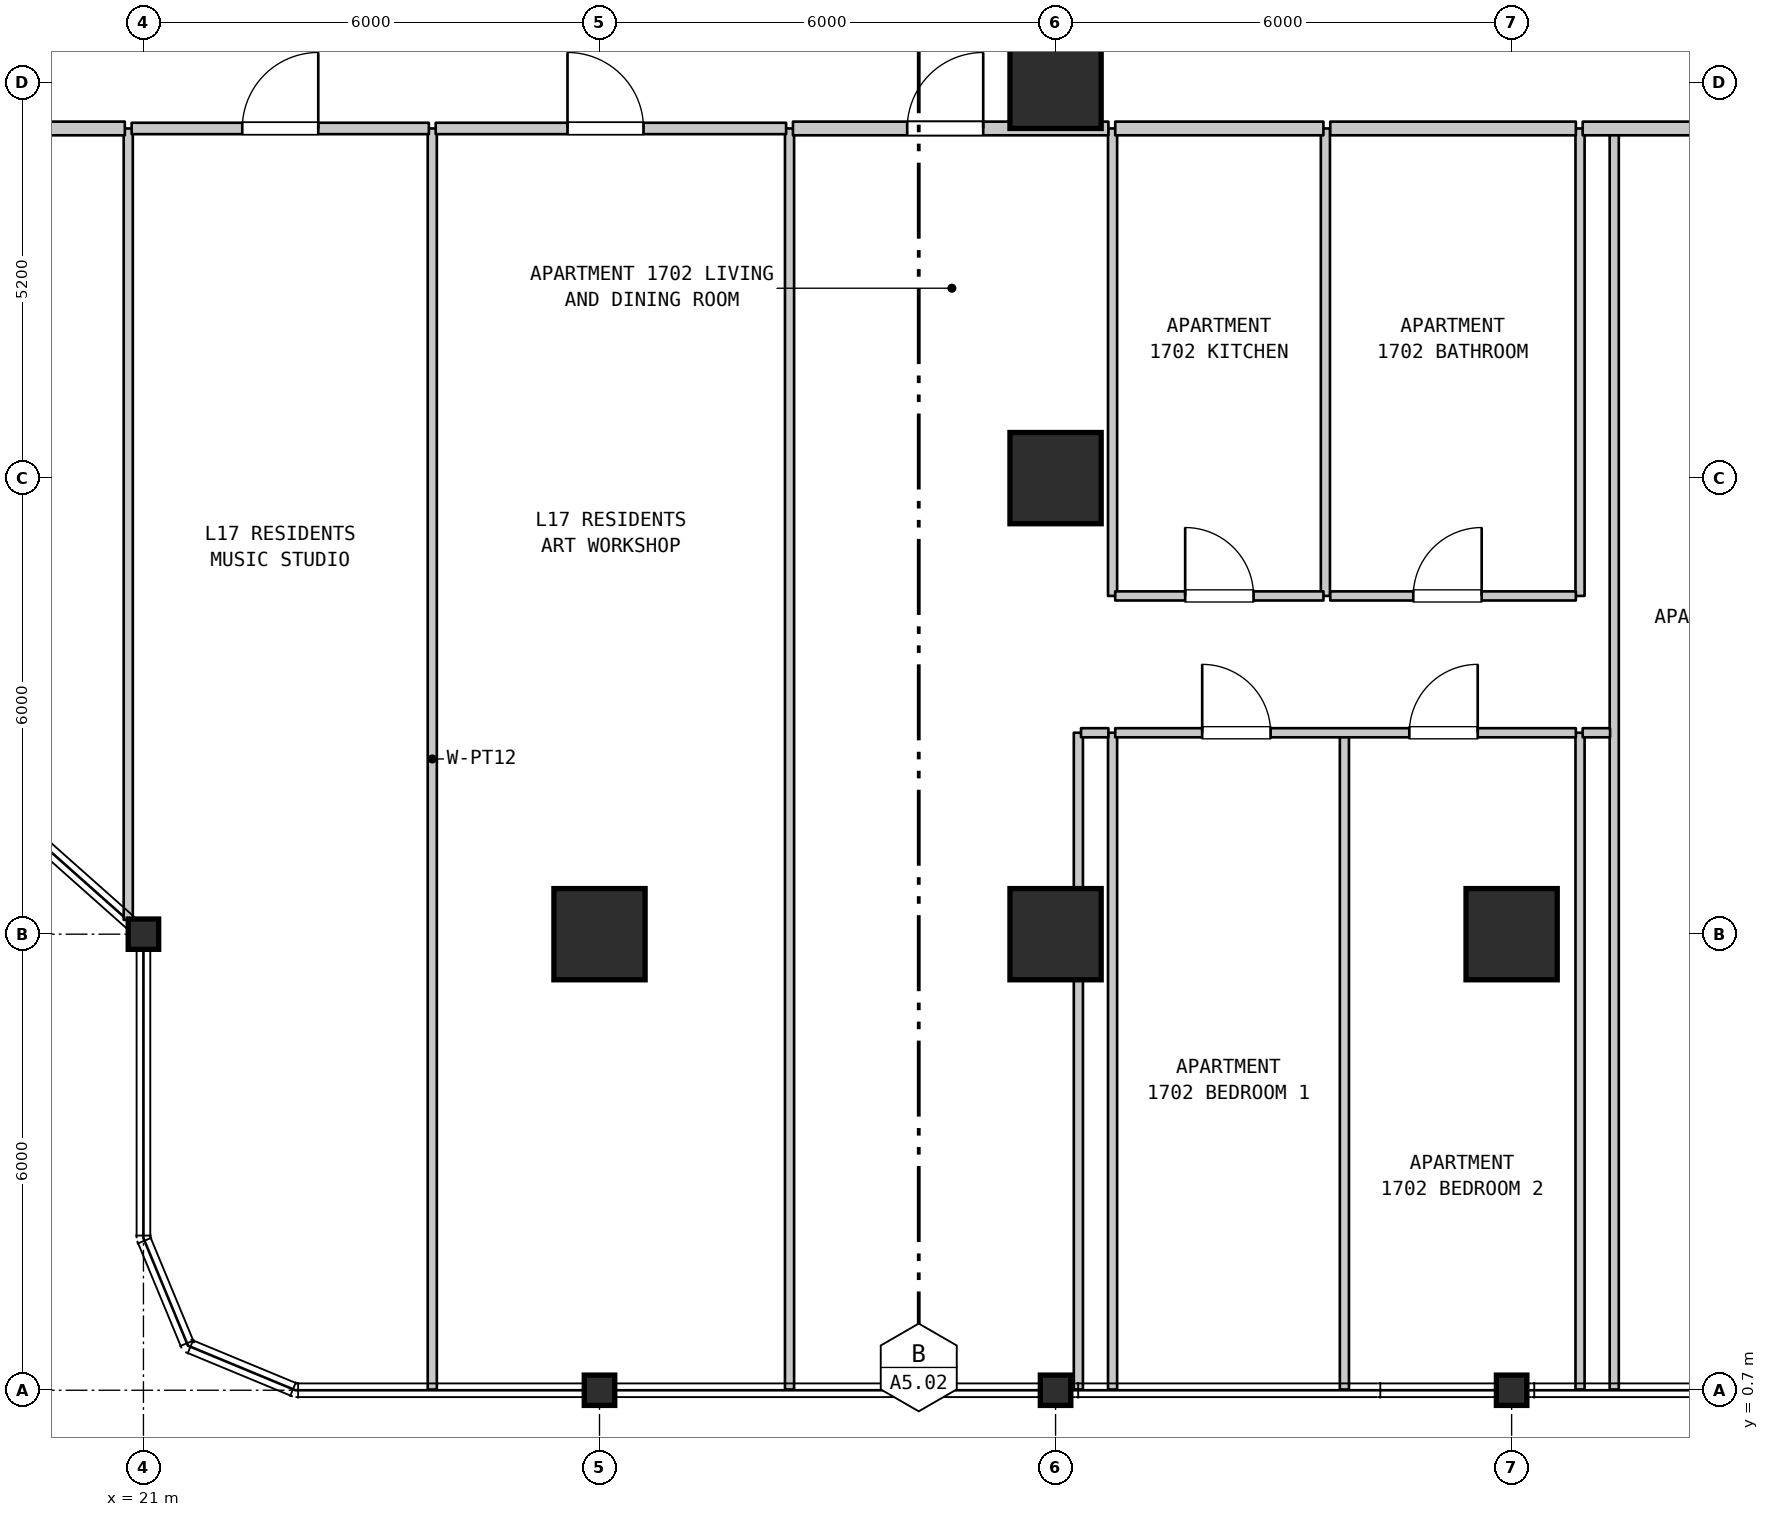
"""IFC4 building model, lengths in metres.
Left out: names, types, materials, properties, quantities, classifications, styles, units other than length and angle.
Written with IfcOpenShell. Run it as: python <this file> out.ifc"""

import sys

from ifc_helpers import new_model, si_unit, direction, frame, frame_2d, origin, origin_2d, place, context, subcontext, project, spatial, rectangle, i_section, extrude, element, fill, save


model = new_model("IFC4")
c1 = context("Model", 3, precision=1e-05, world=origin(), true_north=direction((0.0, 1.0)))
c2 = subcontext(c1, "Body", "Model", "MODEL_VIEW")
j1 = project(units=[si_unit("LENGTHUNIT", "METRE"), si_unit("PLANEANGLEUNIT", "RADIAN")], contexts=[c1])
p1 = place(None, origin())
s1 = spatial("IfcSite", under=j1, at=p1, CompositionType="ELEMENT")
p2 = place(p1, origin())
s2 = spatial("IfcBuilding", under=s1, at=p2, CompositionType="ELEMENT")
p3 = place(p2, frame((0.0, 0.0, 73.8)))
s3 = spatial("IfcBuildingStorey", under=s2, at=p3, CompositionType="ELEMENT", Elevation=73.8)
for number, where, z_axis, x_axis in (
    (1, (21.0, 6.7, 0.0), (0.0, 0.0, 1.0), (1.0, 0.0, 0.0)),
    (2, (27.0, 0.7, 0.0), (0.0, 0.0, 1.0), (1.0, 0.0, 0.0)),
):
    element("IfcColumn", number, at=place(p3, frame(where, z_axis=z_axis, x_axis=x_axis)), inside=s3, PredefinedType="COLUMN", context=c2, shape_type="SweptSolid", body=[
        extrude(i_section(OverallWidth=0.401, OverallDepth=0.399, WebThickness=0.025, FlangeThickness=0.04, FilletRadius=0.015, at=origin_2d()), origin(), (0.0, 0.0, 1.0), 3.7),
    ])
p4 = place(p3, frame((27.0, 6.7, 0.0), z_axis=(0.0, 0.0, 1.0), x_axis=(1.0, 0.0, 0.0)))
e3 = element("IfcColumn", 3, at=p4, inside=s3, PredefinedType="COLUMN", context=c2, shape_type="SweptSolid", body=[
    extrude(rectangle(XDim=1.2, YDim=1.2, at=origin_2d()), origin(), (0.0, 0.0, 1.0), 3.7),
])
p5 = place(p3, frame((33.0, 0.7, 0.0), z_axis=(0.0, 0.0, 1.0), x_axis=(1.0, 0.0, 0.0)))
e4 = element("IfcColumn", 4, at=p5, inside=s3, PredefinedType="COLUMN", context=c2, shape_type="SweptSolid", body=[
    extrude(i_section(OverallWidth=0.401, OverallDepth=0.399, WebThickness=0.025, FlangeThickness=0.04, FilletRadius=0.015, at=origin_2d()), origin(), (0.0, 0.0, 1.0), 3.7),
])
for number, where, z_axis, x_axis in (
    (5, (33.0, 6.7, 0.0), (0.0, 0.0, 1.0), (1.0, 0.0, 0.0)),
    (6, (33.0, 12.7, 0.0), (0.0, 0.0, 1.0), (1.0, 0.0, 0.0)),
    (7, (33.0, 17.9, 0.0), (0.0, 0.0, 1.0), (1.0, 0.0, 0.0)),
):
    element("IfcColumn", number, at=place(p3, frame(where, z_axis=z_axis, x_axis=x_axis)), inside=s3, PredefinedType="COLUMN", context=c2, shape_type="SweptSolid", body=[
        extrude(rectangle(XDim=1.2, YDim=1.2, at=origin_2d()), origin(), (0.0, 0.0, 1.0), 3.7),
    ])
p6 = place(p3, frame((39.0, 0.7, 0.0), z_axis=(0.0, 0.0, 1.0), x_axis=(1.0, 0.0, 0.0)))
e8 = element("IfcColumn", 8, at=p6, inside=s3, PredefinedType="COLUMN", context=c2, shape_type="SweptSolid", body=[
    extrude(i_section(OverallWidth=0.401, OverallDepth=0.399, WebThickness=0.025, FlangeThickness=0.04, FilletRadius=0.015, at=origin_2d()), origin(), (0.0, 0.0, 1.0), 3.7),
])
p7 = place(p3, frame((39.0, 6.7, 0.0), z_axis=(0.0, 0.0, 1.0), x_axis=(1.0, 0.0, 0.0)))
e9 = element("IfcColumn", 9, at=p7, inside=s3, PredefinedType="COLUMN", context=c2, shape_type="SweptSolid", body=[
    extrude(rectangle(XDim=1.2, YDim=1.2, at=origin_2d()), origin(), (0.0, 0.0, 1.0), 3.7),
])
p8 = place(p3, frame((20.8, 6.888, 0.0), z_axis=(0.0, 0.0, 1.0), x_axis=(0.0, 1.0, 0.0)))
e10 = element("IfcWall", 10, at=p8, inside=s3, PredefinedType="PARTITIONING", context=c2, shape_type="SweptSolid", body=[
    extrude(rectangle(XDim=10.412, YDim=0.12, at=frame_2d((5.206, 0.0))), origin(), (0.0, 0.0, 1.0), 3.385),
])
for number, where, z_axis, x_axis in (
    (11, (24.8, 0.71, 0.0), (0.0, 0.0, 1.0), (0.0, 1.0, 0.0)),
    (12, (29.5, 0.71, 0.0), (0.0, 0.0, 1.0), (0.0, 1.0, 0.0)),
):
    element("IfcWall", number, at=place(p3, frame(where, z_axis=z_axis, x_axis=x_axis)), inside=s3, PredefinedType="PARTITIONING", context=c2, shape_type="SweptSolid", body=[
        extrude(rectangle(XDim=16.59, YDim=0.12, at=frame_2d((8.295, 0.0))), origin(), (0.0, 0.0, 1.0), 3.385),
    ])
for number, where, z_axis, x_axis in (
    (13, (33.3, 0.71, 0.0), (0.0, 0.0, 1.0), (0.0, 1.0, 0.0)),
    (14, (33.75, 0.71, 0.0), (0.0, 0.0, 1.0), (0.0, 1.0, 0.0)),
):
    element("IfcWall", number, at=place(p3, frame(where, z_axis=z_axis, x_axis=x_axis)), inside=s3, PredefinedType="PARTITIONING", context=c2, shape_type="SweptSolid", body=[
        extrude(rectangle(XDim=8.64, YDim=0.12, at=frame_2d((4.32, 0.0))), origin(), (0.0, 0.0, 1.0), 3.385),
    ])
for number, where, z_axis, x_axis in (
    (15, (33.75, 11.15, 0.0), (0.0, 0.0, 1.0), (0.0, 1.0, 0.0)),
    (16, (36.55, 11.15, 0.0), (0.0, 0.0, 1.0), (0.0, 1.0, 0.0)),
):
    element("IfcWall", number, at=place(p3, frame(where, z_axis=z_axis, x_axis=x_axis)), inside=s3, PredefinedType="PARTITIONING", context=c2, shape_type="SweptSolid", body=[
        extrude(rectangle(XDim=6.15, YDim=0.12, at=frame_2d((3.075, 0.0))), origin(), (0.0, 0.0, 1.0), 3.385),
    ])
for number, where, z_axis, x_axis in (
    (17, (36.8, 0.71, 0.0), (0.0, 0.0, 1.0), (0.0, 1.0, 0.0)),
    (18, (39.9, 0.71, 0.0), (0.0, 0.0, 1.0), (0.0, 1.0, 0.0)),
):
    element("IfcWall", number, at=place(p3, frame(where, z_axis=z_axis, x_axis=x_axis)), inside=s3, PredefinedType="PARTITIONING", context=c2, shape_type="SweptSolid", body=[
        extrude(rectangle(XDim=8.64, YDim=0.12, at=frame_2d((4.32, 0.0))), origin(), (0.0, 0.0, 1.0), 3.385),
    ])
p9 = place(p3, frame((39.9, 11.15, 0.0), z_axis=(0.0, 0.0, 1.0), x_axis=(0.0, 1.0, 0.0)))
e19 = element("IfcWall", 19, at=p9, inside=s3, PredefinedType="PARTITIONING", context=c2, shape_type="SweptSolid", body=[
    extrude(rectangle(XDim=6.15, YDim=0.12, at=frame_2d((3.075, 0.0))), origin(), (0.0, 0.0, 1.0), 3.385),
])
p10 = place(p3, frame((40.35, 0.71, 0.0), z_axis=(0.0, 0.0, 1.0), x_axis=(0.0, 1.0, 0.0)))
e20 = element("IfcWall", 20, at=p10, inside=s3, PredefinedType="PARTITIONING", context=c2, shape_type="SweptSolid", body=[
    extrude(rectangle(XDim=16.59, YDim=0.12, at=frame_2d((8.295, 0.0))), origin(), (0.0, 0.0, 1.0), 3.385),
])
p11 = place(p3, frame((33.335, 9.35, 0.0), z_axis=(0.0, 0.0, 1.0), x_axis=(1.0, 0.0, 0.0)))
e21 = element("IfcWall", 21, at=p11, inside=s3, PredefinedType="PARTITIONING", context=c2, shape_type="SweptSolid", body=[
    extrude(rectangle(XDim=0.36, YDim=0.12, at=frame_2d((0.18, 0.0))), origin(), (0.0, 0.0, 1.0), 3.385),
])
p12 = place(p3, frame((33.785, 9.35, 0.0), z_axis=(0.0, 0.0, 1.0), x_axis=(1.0, 0.0, 0.0)))
e22 = element("IfcWall", 22, at=p12, inside=s3, PredefinedType="PARTITIONING", context=c2, shape_type="SweptSolid", body=[
    extrude(rectangle(XDim=6.06, YDim=0.12, at=frame_2d((3.03, 0.0))), origin(), (0.0, 0.0, 1.0), 3.385),
])
p13 = place(p12, frame((1.144, 0.0, 0.0)))
e23 = element("IfcOpeningElement", 23, at=p13, cuts=e22, PredefinedType="OPENING", context=c2, shape_type="SweptSolid", body=[
    extrude(rectangle(XDim=0.9, YDim=2.15, at=frame_2d((0.45, 1.075))), frame((0.0, 0.07, 0.0), z_axis=(0.0, -1.0, 0.0), x_axis=(1.0, 0.0, 0.0)), (0.0, 0.0, 1.0), 0.14),
])
p14 = place(p12, frame((3.869, 0.0, 0.0)))
e24 = element("IfcOpeningElement", 24, at=p14, cuts=e22, PredefinedType="OPENING", context=c2, shape_type="SweptSolid", body=[
    extrude(rectangle(XDim=0.9, YDim=2.15, at=frame_2d((0.45, 1.075))), frame((0.0, 0.07, 0.0), z_axis=(0.0, -1.0, 0.0), x_axis=(1.0, 0.0, 0.0)), (0.0, 0.0, 1.0), 0.14),
])
p15 = place(p3, frame((39.935, 9.35, 0.0), z_axis=(0.0, 0.0, 1.0), x_axis=(1.0, 0.0, 0.0)))
e25 = element("IfcWall", 25, at=p15, inside=s3, PredefinedType="PARTITIONING", context=c2, shape_type="SweptSolid", body=[
    extrude(rectangle(XDim=0.36, YDim=0.12, at=frame_2d((0.18, 0.0))), origin(), (0.0, 0.0, 1.0), 3.385),
])
p16 = place(p3, frame((33.785, 11.15, 0.0), z_axis=(0.0, 0.0, 1.0), x_axis=(1.0, 0.0, 0.0)))
e26 = element("IfcWall", 26, at=p16, inside=s3, PredefinedType="PARTITIONING", context=c2, shape_type="SweptSolid", body=[
    extrude(rectangle(XDim=2.739, YDim=0.12, at=frame_2d((1.37, 0.0))), origin(), (0.0, 0.0, 1.0), 3.385),
])
p17 = place(p16, frame((0.92, 0.0, 0.0)))
e27 = element("IfcOpeningElement", 27, at=p17, cuts=e26, PredefinedType="OPENING", context=c2, shape_type="SweptSolid", body=[
    extrude(rectangle(XDim=0.9, YDim=2.15, at=frame_2d((0.45, 1.075))), frame((0.0, 0.07, 0.0), z_axis=(0.0, -1.0, 0.0), x_axis=(1.0, 0.0, 0.0)), (0.0, 0.0, 1.0), 0.14),
])
p18 = place(p3, frame((36.614, 11.15, 0.0), z_axis=(0.0, 0.0, 1.0), x_axis=(1.0, 0.0, 0.0)))
e28 = element("IfcWall", 28, at=p18, inside=s3, PredefinedType="PARTITIONING", context=c2, shape_type="SweptSolid", body=[
    extrude(rectangle(XDim=3.231, YDim=0.12, at=frame_2d((1.615, 0.0))), origin(), (0.0, 0.0, 1.0), 3.385),
])
p19 = place(p18, frame((1.092, 0.0, 0.0)))
e29 = element("IfcOpeningElement", 29, at=p19, cuts=e28, PredefinedType="OPENING", context=c2, shape_type="SweptSolid", body=[
    extrude(rectangle(XDim=0.9, YDim=2.1, at=frame_2d((0.45, 1.05))), frame((0.0, 0.07, 0.0), z_axis=(0.0, -1.0, 0.0), x_axis=(1.0, 0.0, 0.0)), (0.0, 0.0, 1.0), 0.14),
])
p20 = place(p3, frame((18.895, 17.3, 0.0), z_axis=(0.0, 0.0, 1.0), x_axis=(1.0, 0.0, 0.0)))
e30 = element("IfcWall", 30, at=p20, inside=s3, PredefinedType="STANDARD", context=c2, shape_type="SweptSolid", body=[
    extrude(rectangle(XDim=1.86, YDim=0.18, at=frame_2d((0.93, 0.0))), origin(), (0.0, 0.0, 1.0), 3.385),
])
p21 = place(p3, frame((20.845, 17.3, 0.0), z_axis=(0.0, 0.0, 1.0), x_axis=(1.0, 0.0, 0.0)))
e31 = element("IfcWall", 31, at=p21, inside=s3, PredefinedType="STANDARD", context=c2, shape_type="SweptSolid", body=[
    extrude(rectangle(XDim=3.91, YDim=0.15, at=frame_2d((1.955, 0.0))), origin(), (0.0, 0.0, 1.0), 3.385),
])
p22 = place(p21, frame((1.455, 0.0, 0.0)))
e32 = element("IfcOpeningElement", 32, at=p22, cuts=e31, PredefinedType="OPENING", context=c2, shape_type="SweptSolid", body=[
    extrude(rectangle(XDim=1.0, YDim=2.15, at=frame_2d((0.5, 1.075))), frame((0.0, 0.085, 0.0), z_axis=(0.0, -1.0, 0.0), x_axis=(1.0, 0.0, 0.0)), (0.0, 0.0, 1.0), 0.17),
])
p23 = place(p3, frame((24.845, 17.3, 0.0), z_axis=(0.0, 0.0, 1.0), x_axis=(1.0, 0.0, 0.0)))
e33 = element("IfcWall", 33, at=p23, inside=s3, PredefinedType="STANDARD", context=c2, shape_type="SweptSolid", body=[
    extrude(rectangle(XDim=4.61, YDim=0.15, at=frame_2d((2.305, 0.0))), origin(), (0.0, 0.0, 1.0), 3.385),
])
p24 = place(p23, frame((1.734, 0.0, 0.0)))
e34 = element("IfcOpeningElement", 34, at=p24, cuts=e33, PredefinedType="OPENING", context=c2, shape_type="SweptSolid", body=[
    extrude(rectangle(XDim=1.0, YDim=2.15, at=frame_2d((0.5, 1.075))), frame((0.0, 0.085, 0.0), z_axis=(0.0, -1.0, 0.0), x_axis=(1.0, 0.0, 0.0)), (0.0, 0.0, 1.0), 0.17),
])
p25 = place(p3, frame((29.545, 17.3, 0.0), z_axis=(0.0, 0.0, 1.0), x_axis=(1.0, 0.0, 0.0)))
e35 = element("IfcWall", 35, at=p25, inside=s3, PredefinedType="STANDARD", context=c2, shape_type="SweptSolid", body=[
    extrude(rectangle(XDim=4.15, YDim=0.18, at=frame_2d((2.075, 0.0))), origin(), (0.0, 0.0, 1.0), 3.385),
])
p26 = place(p25, frame((1.503, 0.0, 0.0)))
e36 = element("IfcOpeningElement", 36, at=p26, cuts=e35, PredefinedType="OPENING", context=c2, shape_type="SweptSolid", body=[
    extrude(rectangle(XDim=1.0, YDim=2.15, at=frame_2d((0.5, 1.075))), frame((0.0, 0.1, 0.0), z_axis=(0.0, -1.0, 0.0), x_axis=(1.0, 0.0, 0.0)), (0.0, 0.0, 1.0), 0.2),
])
p27 = place(p3, frame((33.785, 17.3, 0.0), z_axis=(0.0, 0.0, 1.0), x_axis=(1.0, 0.0, 0.0)))
e37 = element("IfcWall", 37, at=p27, inside=s3, PredefinedType="STANDARD", context=c2, shape_type="SweptSolid", body=[
    extrude(rectangle(XDim=2.739, YDim=0.18, at=frame_2d((1.37, 0.0))), origin(), (0.0, 0.0, 1.0), 3.385),
])
p28 = place(p3, frame((36.614, 17.3, 0.0), z_axis=(0.0, 0.0, 1.0), x_axis=(1.0, 0.0, 0.0)))
e38 = element("IfcWall", 38, at=p28, inside=s3, PredefinedType="STANDARD", context=c2, shape_type="SweptSolid", body=[
    extrude(rectangle(XDim=3.231, YDim=0.18, at=frame_2d((1.615, 0.0))), origin(), (0.0, 0.0, 1.0), 3.385),
])
p29 = place(p3, frame((39.935, 17.3, 0.0), z_axis=(0.0, 0.0, 1.0), x_axis=(1.0, 0.0, 0.0)))
e39 = element("IfcWall", 39, at=p29, inside=s3, PredefinedType="STANDARD", context=c2, shape_type="SweptSolid", body=[
    extrude(rectangle(XDim=4.64, YDim=0.18, at=frame_2d((2.32, 0.0))), origin(), (0.0, 0.0, 1.0), 3.385),
])
p30 = place(p29, frame((2.02, 0.0, 0.0)))
e40 = element("IfcOpeningElement", 40, at=p30, cuts=e39, PredefinedType="OPENING", context=c2, shape_type="SweptSolid", body=[
    extrude(rectangle(XDim=1.0, YDim=2.15, at=frame_2d((0.5, 1.075))), frame((0.0, 0.1, 0.0), z_axis=(0.0, -1.0, 0.0), x_axis=(1.0, 0.0, 0.0)), (0.0, 0.0, 1.0), 0.2),
])
p31 = place(p13, origin())
e41 = element("IfcDoor", 41, at=p31, inside=s3, OperationType="SINGLE_SWING_LEFT", PredefinedType="DOOR", context=c2, shape_type="SweptSolid", body=[
    extrude(rectangle(XDim=0.9, YDim=2.15, at=frame_2d((0.45, 1.075))), frame((0.0, 0.025, 0.0), z_axis=(0.0, -1.0, 0.0), x_axis=(1.0, 0.0, 0.0)), (0.0, 0.0, 1.0), 0.05),
])
fill(e23, e41)
p32 = place(p14, origin())
e42 = element("IfcDoor", 42, at=p32, inside=s3, OperationType="SINGLE_SWING_RIGHT", PredefinedType="DOOR", context=c2, shape_type="SweptSolid", body=[
    extrude(rectangle(XDim=0.9, YDim=2.15, at=frame_2d((0.45, 1.075))), frame((0.0, 0.025, 0.0), z_axis=(0.0, -1.0, 0.0), x_axis=(1.0, 0.0, 0.0)), (0.0, 0.0, 1.0), 0.05),
])
fill(e24, e42)
p33 = place(p17, origin())
e43 = element("IfcDoor", 43, at=p33, inside=s3, OperationType="SINGLE_SWING_LEFT", PredefinedType="DOOR", context=c2, shape_type="SweptSolid", body=[
    extrude(rectangle(XDim=0.9, YDim=2.15, at=frame_2d((0.45, 1.075))), frame((0.0, 0.025, 0.0), z_axis=(0.0, -1.0, 0.0), x_axis=(1.0, 0.0, 0.0)), (0.0, 0.0, 1.0), 0.05),
])
fill(e27, e43)
p34 = place(p19, origin())
e44 = element("IfcDoor", 44, at=p34, inside=s3, OperationType="SINGLE_SWING_RIGHT", PredefinedType="DOOR", context=c2, shape_type="SweptSolid", body=[
    extrude(rectangle(XDim=0.9, YDim=2.1, at=frame_2d((0.45, 1.05))), frame((0.0, 0.025, 0.0), z_axis=(0.0, -1.0, 0.0), x_axis=(1.0, 0.0, 0.0)), (0.0, 0.0, 1.0), 0.05),
])
fill(e29, e44)
p35 = place(p22, origin())
e45 = element("IfcDoor", 45, at=p35, inside=s3, OperationType="SINGLE_SWING_RIGHT", PredefinedType="DOOR", context=c2, shape_type="SweptSolid", body=[
    extrude(rectangle(XDim=1.0, YDim=2.15, at=frame_2d((0.5, 1.075))), frame((0.0, 0.025, 0.0), z_axis=(0.0, -1.0, 0.0), x_axis=(1.0, 0.0, 0.0)), (0.0, 0.0, 1.0), 0.05),
])
fill(e32, e45)
p36 = place(p24, origin())
e46 = element("IfcDoor", 46, at=p36, inside=s3, OperationType="SINGLE_SWING_LEFT", PredefinedType="DOOR", context=c2, shape_type="SweptSolid", body=[
    extrude(rectangle(XDim=1.0, YDim=2.15, at=frame_2d((0.5, 1.075))), frame((0.0, 0.025, 0.0), z_axis=(0.0, -1.0, 0.0), x_axis=(1.0, 0.0, 0.0)), (0.0, 0.0, 1.0), 0.05),
])
fill(e34, e46)
p37 = place(p26, origin())
e47 = element("IfcDoor", 47, at=p37, inside=s3, OperationType="SINGLE_SWING_RIGHT", PredefinedType="DOOR", context=c2, shape_type="SweptSolid", body=[
    extrude(rectangle(XDim=1.0, YDim=2.15, at=frame_2d((0.5, 1.075))), frame((0.0, 0.025, 0.0), z_axis=(0.0, -1.0, 0.0), x_axis=(1.0, 0.0, 0.0)), (0.0, 0.0, 1.0), 0.05),
])
fill(e36, e47)
save(model, sys.argv[1])
